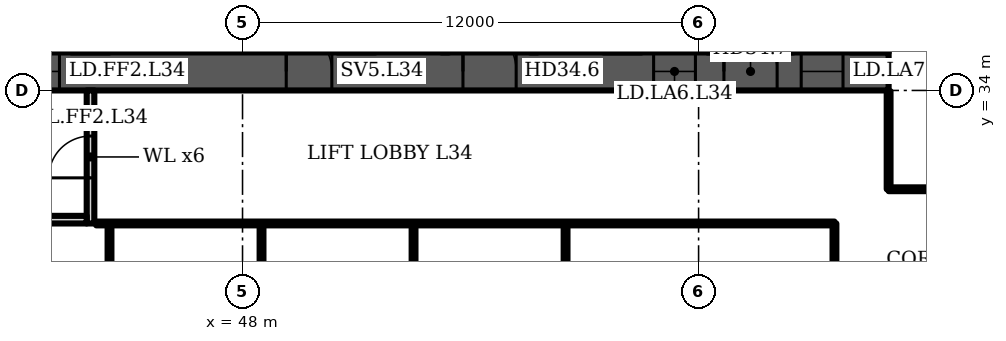
"""IFC4 building model, lengths in metres.
Left out: names, types, materials, properties, quantities, classifications, styles, units other than length and angle.
Written with IfcOpenShell. Run it as: python <this file> out.ifc"""

import sys

from ifc_helpers import new_model, si_unit, direction, frame, frame_2d, origin, place, context, subcontext, project, spatial, rectangle, extrude, element, fill, save


model = new_model("IFC4")
c1 = context("Model", 3, precision=1e-05, world=origin(), true_north=direction((0.0, 1.0)))
c2 = subcontext(c1, "Body", "Model", "MODEL_VIEW")
j1 = project(units=[si_unit("LENGTHUNIT", "METRE"), si_unit("PLANEANGLEUNIT", "RADIAN")], contexts=[c1])
p1 = place(None, origin())
s1 = spatial("IfcSite", under=j1, at=p1, CompositionType="ELEMENT")
p2 = place(p1, origin())
s2 = spatial("IfcBuilding", under=s1, at=p2, CompositionType="ELEMENT")
p3 = place(p2, frame((0.0, 0.0, 143.5)))
s3 = spatial("IfcBuildingStorey", under=s2, at=p3, CompositionType="ELEMENT", Elevation=143.5)
p4 = place(p3, frame((16.0, 34.5, 0.0), z_axis=(0.0, 0.0, 1.0), x_axis=(1.0, 0.0, 0.0)))
e1 = element("IfcWall", 1, at=p4, inside=s3, PredefinedType="SHEAR", context=c2, shape_type="SweptSolid", body=[
    extrude(rectangle(XDim=49.0, YDim=1.0, at=frame_2d((24.5, 0.0))), origin(), (0.0, 0.0, 1.0), 3.6),
])
p5 = place(p4, frame((1.2, 0.0, 0.0)))
e2 = element("IfcOpeningElement", 2, at=p5, cuts=e1, PredefinedType="OPENING", context=c2, shape_type="SweptSolid", body=[
    extrude(rectangle(XDim=1.1, YDim=2.1, at=frame_2d((0.55, 1.05))), frame((0.0, 0.51, 0.0), z_axis=(0.0, -1.0, 0.0), x_axis=(1.0, 0.0, 0.0)), (0.0, 0.0, 1.0), 1.02),
])
p6 = place(p4, frame((5.083, 0.0, 0.0)))
e3 = element("IfcOpeningElement", 3, at=p6, cuts=e1, PredefinedType="OPENING", context=c2, shape_type="SweptSolid", body=[
    extrude(rectangle(XDim=1.1, YDim=2.1, at=frame_2d((0.55, 1.05))), frame((0.0, 0.51, 0.0), z_axis=(0.0, -1.0, 0.0), x_axis=(1.0, 0.0, 0.0)), (0.0, 0.0, 1.0), 1.02),
])
p7 = place(p4, frame((2.933, 0.0, 0.0)))
e4 = element("IfcOpeningElement", 4, at=p7, cuts=e1, PredefinedType="OPENING", context=c2, shape_type="SweptSolid", body=[
    extrude(rectangle(XDim=1.4, YDim=2.1, at=frame_2d((0.7, 1.05))), frame((0.0, 0.51, 0.0), z_axis=(0.0, -1.0, 0.0), x_axis=(1.0, 0.0, 0.0)), (0.0, 0.0, 1.0), 1.02),
])
p8 = place(p4, frame((7.65, 0.0, 0.0)))
e5 = element("IfcOpeningElement", 5, at=p8, cuts=e1, PredefinedType="OPENING", context=c2, shape_type="SweptSolid", body=[
    extrude(rectangle(XDim=1.2, YDim=2.1, at=frame_2d((0.6, 1.05))), frame((0.0, 0.51, 0.0), z_axis=(0.0, -1.0, 0.0), x_axis=(1.0, 0.0, 0.0)), (0.0, 0.0, 1.0), 1.02),
])
p9 = place(p4, frame((14.817, 0.0, 0.0)))
e6 = element("IfcOpeningElement", 6, at=p9, cuts=e1, PredefinedType="OPENING", context=c2, shape_type="SweptSolid", body=[
    extrude(rectangle(XDim=1.1, YDim=2.1, at=frame_2d((0.55, 1.05))), frame((0.0, 0.51, 0.0), z_axis=(0.0, -1.0, 0.0), x_axis=(1.0, 0.0, 0.0)), (0.0, 0.0, 1.0), 1.02),
])
p10 = place(p4, frame((19.083, 0.0, 0.0)))
e7 = element("IfcOpeningElement", 7, at=p10, cuts=e1, PredefinedType="OPENING", context=c2, shape_type="SweptSolid", body=[
    extrude(rectangle(XDim=1.1, YDim=2.1, at=frame_2d((0.55, 1.05))), frame((0.0, 0.51, 0.0), z_axis=(0.0, -1.0, 0.0), x_axis=(1.0, 0.0, 0.0)), (0.0, 0.0, 1.0), 1.02),
])
p11 = place(p4, frame((16.8, 0.0, 0.0)))
e8 = element("IfcOpeningElement", 8, at=p11, cuts=e1, PredefinedType="OPENING", context=c2, shape_type="SweptSolid", body=[
    extrude(rectangle(XDim=1.4, YDim=2.1, at=frame_2d((0.7, 1.05))), frame((0.0, 0.51, 0.0), z_axis=(0.0, -1.0, 0.0), x_axis=(1.0, 0.0, 0.0)), (0.0, 0.0, 1.0), 1.02),
])
p12 = place(p4, frame((21.817, 0.0, 0.0)))
e9 = element("IfcOpeningElement", 9, at=p12, cuts=e1, PredefinedType="OPENING", context=c2, shape_type="SweptSolid", body=[
    extrude(rectangle(XDim=1.1, YDim=2.1, at=frame_2d((0.55, 1.05))), frame((0.0, 0.51, 0.0), z_axis=(0.0, -1.0, 0.0), x_axis=(1.0, 0.0, 0.0)), (0.0, 0.0, 1.0), 1.02),
])
p13 = place(p4, frame((26.083, 0.0, 0.0)))
e10 = element("IfcOpeningElement", 10, at=p13, cuts=e1, PredefinedType="OPENING", context=c2, shape_type="SweptSolid", body=[
    extrude(rectangle(XDim=1.1, YDim=2.1, at=frame_2d((0.55, 1.05))), frame((0.0, 0.51, 0.0), z_axis=(0.0, -1.0, 0.0), x_axis=(1.0, 0.0, 0.0)), (0.0, 0.0, 1.0), 1.02),
])
p14 = place(p4, frame((33.15, 0.0, 0.0)))
e11 = element("IfcOpeningElement", 11, at=p14, cuts=e1, PredefinedType="OPENING", context=c2, shape_type="SweptSolid", body=[
    extrude(rectangle(XDim=1.2, YDim=2.1, at=frame_2d((0.6, 1.05))), frame((0.0, 0.51, 0.0), z_axis=(0.0, -1.0, 0.0), x_axis=(1.0, 0.0, 0.0)), (0.0, 0.0, 1.0), 1.02),
])
p15 = place(p4, frame((37.8, 0.0, 0.0)))
e12 = element("IfcOpeningElement", 12, at=p15, cuts=e1, PredefinedType="OPENING", context=c2, shape_type="SweptSolid", body=[
    extrude(rectangle(XDim=1.4, YDim=2.1, at=frame_2d((0.7, 1.05))), frame((0.0, 0.51, 0.0), z_axis=(0.0, -1.0, 0.0), x_axis=(1.0, 0.0, 0.0)), (0.0, 0.0, 1.0), 1.02),
])
p16 = place(p4, frame((42.817, 0.0, 0.0)))
e13 = element("IfcOpeningElement", 13, at=p16, cuts=e1, PredefinedType="OPENING", context=c2, shape_type="SweptSolid", body=[
    extrude(rectangle(XDim=1.1, YDim=2.1, at=frame_2d((0.55, 1.05))), frame((0.0, 0.51, 0.0), z_axis=(0.0, -1.0, 0.0), x_axis=(1.0, 0.0, 0.0)), (0.0, 0.0, 1.0), 1.02),
])
p17 = place(p4, frame((46.7, 0.0, 0.0)))
e14 = element("IfcOpeningElement", 14, at=p17, cuts=e1, PredefinedType="OPENING", context=c2, shape_type="SweptSolid", body=[
    extrude(rectangle(XDim=1.1, YDim=2.1, at=frame_2d((0.55, 1.05))), frame((0.0, 0.51, 0.0), z_axis=(0.0, -1.0, 0.0), x_axis=(1.0, 0.0, 0.0)), (0.0, 0.0, 1.0), 1.02),
])
p18 = place(p4, frame((44.667, 0.0, 0.0)))
e15 = element("IfcOpeningElement", 15, at=p18, cuts=e1, PredefinedType="OPENING", context=c2, shape_type="SweptSolid", body=[
    extrude(rectangle(XDim=1.4, YDim=2.1, at=frame_2d((0.7, 1.05))), frame((0.0, 0.51, 0.0), z_axis=(0.0, -1.0, 0.0), x_axis=(1.0, 0.0, 0.0)), (0.0, 0.0, 1.0), 1.02),
])
p19 = place(p3, frame((44.0, 30.5, 0.0), z_axis=(0.0, 0.0, 1.0), x_axis=(0.0, 1.0, 0.0)))
e16 = element("IfcWall", 16, at=p19, inside=s3, PredefinedType="PARTITIONING", context=c2, shape_type="SweptSolid", body=[
    extrude(rectangle(XDim=3.5, YDim=0.2, at=frame_2d((1.75, 0.0))), origin(), (0.0, 0.0, 1.0), 3.15),
])
p20 = place(p19, frame((1.2, 0.0, 0.0)))
e17 = element("IfcOpeningElement", 17, at=p20, cuts=e16, PredefinedType="OPENING", context=c2, shape_type="SweptSolid", body=[
    extrude(rectangle(XDim=1.1, YDim=2.1, at=frame_2d((0.55, 1.05))), frame((0.0, 0.11, 0.0), z_axis=(0.0, -1.0, 0.0), x_axis=(1.0, 0.0, 0.0)), (0.0, 0.0, 1.0), 0.22),
])
p21 = place(p3, frame((41.1, 30.6, 0.0), z_axis=(0.0, 0.0, 1.0), x_axis=(1.0, 0.0, 0.0)))
e18 = element("IfcWall", 18, at=p21, inside=s3, PredefinedType="PARTITIONING", context=c2, shape_type="SweptSolid", body=[
    extrude(rectangle(XDim=2.8, YDim=0.2, at=frame_2d((1.4, 0.0))), origin(), (0.0, 0.0, 1.0), 3.15),
])
for number, where, z_axis, x_axis in (
    (19, (44.5, 14.53, 0.0), (0.0, 0.0, 1.0), (0.0, 1.0, 0.0)),
    (20, (48.5, 14.53, 0.0), (0.0, 0.0, 1.0), (0.0, 1.0, 0.0)),
    (21, (52.5, 14.53, 0.0), (0.0, 0.0, 1.0), (0.0, 1.0, 0.0)),
    (22, (56.5, 14.53, 0.0), (0.0, 0.0, 1.0), (0.0, 1.0, 0.0)),
    (23, (63.575, 14.53, 0.0), (0.0, 0.0, 1.0), (0.0, 1.0, 0.0)),
):
    element("IfcWall", number, at=place(p3, frame(where, z_axis=z_axis, x_axis=x_axis)), inside=s3, PredefinedType="PARTITIONING", context=c2, shape_type="SweptSolid", body=[
        extrude(rectangle(XDim=15.97, YDim=0.1, at=frame_2d((7.985, 0.0))), origin(), (0.0, 0.0, 1.0), 3.15),
    ])
p22 = place(p3, frame((65.0, 31.4, 0.0), z_axis=(0.0, 0.0, 1.0), x_axis=(0.0, 1.0, 0.0)))
e24 = element("IfcWall", 24, at=p22, inside=s3, PredefinedType="PARTITIONING", context=c2, shape_type="SweptSolid", body=[
    extrude(rectangle(XDim=2.58, YDim=0.1, at=frame_2d((1.29, 0.0))), origin(), (0.0, 0.0, 1.0), 3.15),
])
p23 = place(p3, frame((65.0, 31.4, 0.0), z_axis=(0.0, 0.0, 1.0), x_axis=(1.0, 0.0, 0.0)))
e25 = element("IfcWall", 25, at=p23, inside=s3, PredefinedType="PARTITIONING", context=c2, shape_type="SweptSolid", body=[
    extrude(rectangle(XDim=4.69, YDim=0.1, at=frame_2d((2.345, 0.0))), origin(), (0.0, 0.0, 1.0), 3.15),
])
p24 = place(p23, frame((1.14, 0.0, 0.0)))
e26 = element("IfcOpeningElement", 26, at=p24, cuts=e25, PredefinedType="OPENING", context=c2, shape_type="SweptSolid", body=[
    extrude(rectangle(XDim=1.8, YDim=2.1, at=frame_2d((0.9, 1.05))), frame((0.0, 0.06, 0.0), z_axis=(0.0, -1.0, 0.0), x_axis=(1.0, 0.0, 0.0)), (0.0, 0.0, 1.0), 0.12),
])
p25 = place(p3, frame((44.15, 30.5, 0.0), z_axis=(0.0, 0.0, 1.0), x_axis=(1.0, 0.0, 0.0)))
e27 = element("IfcWall", 27, at=p25, inside=s3, PredefinedType="PARTITIONING", context=c2, shape_type="SweptSolid", body=[
    extrude(rectangle(XDim=19.425, YDim=0.1, at=frame_2d((9.712, 0.0))), origin(), (0.0, 0.0, 1.0), 3.15),
])
p26 = place(p13, origin())
e28 = element("IfcDoor", 28, at=p26, inside=s3, OperationType="DOUBLE_DOOR_SLIDING", PredefinedType="DOOR", context=c2, shape_type="SweptSolid", body=[
    extrude(rectangle(XDim=1.1, YDim=2.1, at=frame_2d((0.55, 1.05))), frame((0.0, 0.025, 0.0), z_axis=(0.0, -1.0, 0.0), x_axis=(1.0, 0.0, 0.0)), (0.0, 0.0, 1.0), 0.05),
])
fill(e10, e28)
p27 = place(p14, origin())
e29 = element("IfcDoor", 29, at=p27, inside=s3, OperationType="SINGLE_SWING_LEFT", PredefinedType="DOOR", context=c2, shape_type="SweptSolid", body=[
    extrude(rectangle(XDim=1.2, YDim=2.1, at=frame_2d((0.6, 1.05))), frame((0.0, 0.025, 0.0), z_axis=(0.0, -1.0, 0.0), x_axis=(1.0, 0.0, 0.0)), (0.0, 0.0, 1.0), 0.05),
])
fill(e11, e29)
p28 = place(p15, origin())
e30 = element("IfcDoor", 30, at=p28, inside=s3, OperationType="DOUBLE_DOOR_SINGLE_SWING", PredefinedType="DOOR", context=c2, shape_type="SweptSolid", body=[
    extrude(rectangle(XDim=1.4, YDim=2.1, at=frame_2d((0.7, 1.05))), frame((0.0, 0.025, 0.0), z_axis=(0.0, -1.0, 0.0), x_axis=(1.0, 0.0, 0.0)), (0.0, 0.0, 1.0), 0.05),
])
fill(e12, e30)
p29 = place(p16, origin())
e31 = element("IfcDoor", 31, at=p29, inside=s3, OperationType="DOUBLE_DOOR_SLIDING", PredefinedType="DOOR", context=c2, shape_type="SweptSolid", body=[
    extrude(rectangle(XDim=1.1, YDim=2.1, at=frame_2d((0.55, 1.05))), frame((0.0, 0.025, 0.0), z_axis=(0.0, -1.0, 0.0), x_axis=(1.0, 0.0, 0.0)), (0.0, 0.0, 1.0), 0.05),
])
fill(e13, e31)
p30 = place(p17, origin())
e32 = element("IfcDoor", 32, at=p30, inside=s3, OperationType="DOUBLE_DOOR_SLIDING", PredefinedType="DOOR", context=c2, shape_type="SweptSolid", body=[
    extrude(rectangle(XDim=1.1, YDim=2.1, at=frame_2d((0.55, 1.05))), frame((0.0, 0.025, 0.0), z_axis=(0.0, -1.0, 0.0), x_axis=(1.0, 0.0, 0.0)), (0.0, 0.0, 1.0), 0.05),
])
fill(e14, e32)
p31 = place(p18, origin())
e33 = element("IfcDoor", 33, at=p31, inside=s3, OperationType="DOUBLE_DOOR_SINGLE_SWING", PredefinedType="DOOR", context=c2, shape_type="SweptSolid", body=[
    extrude(rectangle(XDim=1.4, YDim=2.1, at=frame_2d((0.7, 1.05))), frame((0.0, 0.025, 0.0), z_axis=(0.0, -1.0, 0.0), x_axis=(1.0, 0.0, 0.0)), (0.0, 0.0, 1.0), 0.05),
])
fill(e15, e33)
p32 = place(p20, origin())
e34 = element("IfcDoor", 34, at=p32, inside=s3, OperationType="SINGLE_SWING_LEFT", PredefinedType="DOOR", context=c2, shape_type="SweptSolid", body=[
    extrude(rectangle(XDim=1.1, YDim=2.1, at=frame_2d((0.55, 1.05))), frame((0.0, 0.025, 0.0), z_axis=(0.0, -1.0, 0.0), x_axis=(1.0, 0.0, 0.0)), (0.0, 0.0, 1.0), 0.05),
])
fill(e17, e34)
save(model, sys.argv[1])
